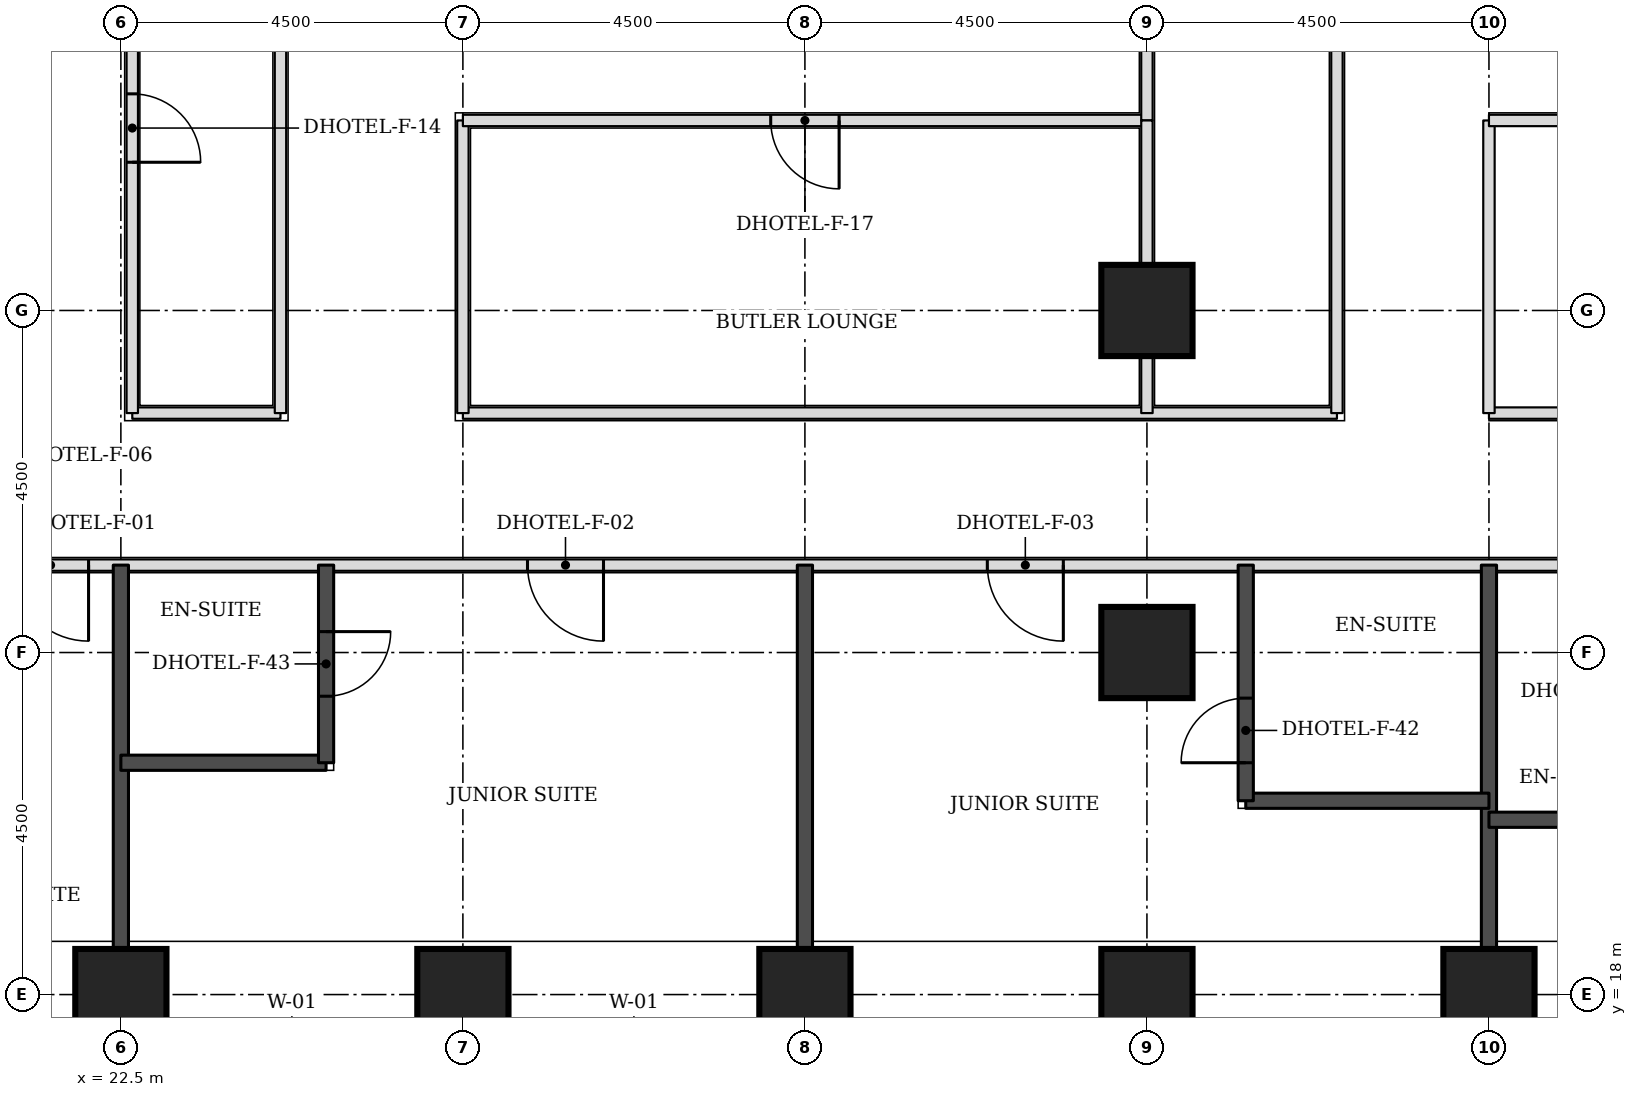
"""IFC4 building model, lengths in metres.
Left out: names, types, materials, properties, quantities, classifications, styles, units other than length and angle.
Written with IfcOpenShell. Run it as: python <this file> out.ifc"""

import sys

from ifc_helpers import new_model, si_unit, direction, frame, frame_2d, origin, origin_2d, place, context, subcontext, project, spatial, rectangle, extrude, element, fill, save


model = new_model("IFC4")
c1 = context("Model", 3, precision=1e-05, world=origin(), true_north=direction((0.0, 1.0)))
c2 = subcontext(c1, "Body", "Model", "MODEL_VIEW")
j1 = project(units=[si_unit("LENGTHUNIT", "METRE"), si_unit("PLANEANGLEUNIT", "RADIAN")], contexts=[c1])
p1 = place(None, origin())
s1 = spatial("IfcSite", under=j1, at=p1, CompositionType="ELEMENT")
p2 = place(p1, origin())
s2 = spatial("IfcBuilding", under=s1, at=p2, CompositionType="ELEMENT")
p3 = place(p2, frame((0.0, 0.0, 42.9)))
s3 = spatial("IfcBuildingStorey", under=s2, at=p3, CompositionType="ELEMENT", Elevation=42.9)
for number, where, z_axis, x_axis in (
    (1, (22.5, 18.0, 0.0), (0.0, 0.0, 1.0), (1.0, 0.0, 0.0)),
    (2, (27.0, 18.0, 0.0), (0.0, 0.0, 1.0), (1.0, 0.0, 0.0)),
    (3, (31.5, 18.0, 0.0), (0.0, 0.0, 1.0), (1.0, 0.0, 0.0)),
    (4, (36.0, 18.0, 0.0), (0.0, 0.0, 1.0), (1.0, 0.0, 0.0)),
    (5, (40.5, 18.0, 0.0), (0.0, 0.0, 1.0), (1.0, 0.0, 0.0)),
    (6, (36.0, 22.5, 0.0), (0.0, 0.0, 1.0), (1.0, 0.0, 0.0)),
    (7, (36.0, 27.0, 0.0), (0.0, 0.0, 1.0), (1.0, 0.0, 0.0)),
):
    element("IfcColumn", number, at=place(p3, frame(where, z_axis=z_axis, x_axis=x_axis)), inside=s3, PredefinedType="COLUMN", context=c2, shape_type="SweptSolid", body=[
        extrude(rectangle(XDim=1.2, YDim=1.2, at=origin_2d()), origin(), (0.0, 0.0, 1.0), 3.3),
    ])
p4 = place(p3, frame((20.65, 23.65, 0.0), z_axis=(0.0, 0.0, 1.0), x_axis=(1.0, 0.0, 0.0)))
e8 = element("IfcWall", 8, at=p4, inside=s3, PredefinedType="PARTITIONING", context=c2, shape_type="SweptSolid", body=[
    extrude(rectangle(XDim=30.85, YDim=0.15, at=frame_2d((15.425, 0.0))), origin(), (0.0, 0.0, 1.0), 3.08),
])
p5 = place(p4, frame((7.2, 0.0, 0.0)))
e9 = element("IfcOpeningElement", 9, at=p5, cuts=e8, PredefinedType="OPENING", context=c2, shape_type="SweptSolid", body=[
    extrude(rectangle(XDim=1.0, YDim=2.1, at=frame_2d((0.5, 1.05))), frame((0.0, 0.085, 0.0), z_axis=(0.0, -1.0, 0.0), x_axis=(1.0, 0.0, 0.0)), (0.0, 0.0, 1.0), 0.17),
])
p6 = place(p4, frame((13.25, 0.0, 0.0)))
e10 = element("IfcOpeningElement", 10, at=p6, cuts=e8, PredefinedType="OPENING", context=c2, shape_type="SweptSolid", body=[
    extrude(rectangle(XDim=1.0, YDim=2.1, at=frame_2d((0.5, 1.05))), frame((0.0, 0.085, 0.0), z_axis=(0.0, -1.0, 0.0), x_axis=(1.0, 0.0, 0.0)), (0.0, 0.0, 1.0), 0.17),
])
p7 = place(p4, frame((25.2, 0.0, 0.0)))
e11 = element("IfcOpeningElement", 11, at=p7, cuts=e8, PredefinedType="OPENING", context=c2, shape_type="SweptSolid", body=[
    extrude(rectangle(XDim=1.0, YDim=2.1, at=frame_2d((0.5, 1.05))), frame((0.0, 0.085, 0.0), z_axis=(0.0, -1.0, 0.0), x_axis=(1.0, 0.0, 0.0)), (0.0, 0.0, 1.0), 0.17),
])
p8 = place(p4, frame((0.425, 0.0, 0.0)))
e12 = element("IfcOpeningElement", 12, at=p8, cuts=e8, PredefinedType="OPENING", context=c2, shape_type="SweptSolid", body=[
    extrude(rectangle(XDim=1.0, YDim=2.1, at=frame_2d((0.5, 1.05))), frame((0.0, 0.085, 0.0), z_axis=(0.0, -1.0, 0.0), x_axis=(1.0, 0.0, 0.0)), (0.0, 0.0, 1.0), 0.17),
])
p9 = place(p4, frame((29.35, 0.0, 0.0)))
e13 = element("IfcOpeningElement", 13, at=p9, cuts=e8, PredefinedType="OPENING", context=c2, shape_type="SweptSolid", body=[
    extrude(rectangle(XDim=1.0, YDim=2.1, at=frame_2d((0.5, 1.05))), frame((0.0, 0.085, 0.0), z_axis=(0.0, -1.0, 0.0), x_axis=(1.0, 0.0, 0.0)), (0.0, 0.0, 1.0), 0.17),
])
p10 = place(p3, frame((22.65, 25.65, 0.0), z_axis=(0.0, 0.0, 1.0), x_axis=(1.0, 0.0, 0.0)))
e14 = element("IfcWall", 14, at=p10, inside=s3, PredefinedType="PARTITIONING", context=c2, shape_type="SweptSolid", body=[
    extrude(rectangle(XDim=1.95, YDim=0.15, at=frame_2d((0.975, 0.0))), origin(), (0.0, 0.0, 1.0), 3.08),
])
p11 = place(p3, frame((22.65, 25.65, 0.0), z_axis=(0.0, 0.0, 1.0), x_axis=(0.0, 1.0, 0.0)))
e15 = element("IfcWall", 15, at=p11, inside=s3, PredefinedType="PARTITIONING", context=c2, shape_type="SweptSolid", body=[
    extrude(rectangle(XDim=17.35, YDim=0.15, at=frame_2d((8.675, 0.0))), origin(), (0.0, 0.0, 1.0), 3.08),
])
p12 = place(p11, frame((3.3, 0.0, 0.0)))
e16 = element("IfcOpeningElement", 16, at=p12, cuts=e15, PredefinedType="OPENING", context=c2, shape_type="SweptSolid", body=[
    extrude(rectangle(XDim=0.9, YDim=2.1, at=frame_2d((0.45, 1.05))), frame((0.0, 0.085, 0.0), z_axis=(0.0, -1.0, 0.0), x_axis=(1.0, 0.0, 0.0)), (0.0, 0.0, 1.0), 0.17),
])
p13 = place(p3, frame((24.6, 25.65, 0.0), z_axis=(0.0, 0.0, 1.0), x_axis=(0.0, 1.0, 0.0)))
e17 = element("IfcWall", 17, at=p13, inside=s3, PredefinedType="PARTITIONING", context=c2, shape_type="SweptSolid", body=[
    extrude(rectangle(XDim=14.85, YDim=0.15, at=frame_2d((7.425, 0.0))), origin(), (0.0, 0.0, 1.0), 3.08),
])
p14 = place(p3, frame((27.0, 25.65, 0.0), z_axis=(0.0, 0.0, 1.0), x_axis=(1.0, 0.0, 0.0)))
e18 = element("IfcWall", 18, at=p14, inside=s3, PredefinedType="PARTITIONING", context=c2, shape_type="SweptSolid", body=[
    extrude(rectangle(XDim=11.5, YDim=0.15, at=frame_2d((5.75, 0.0))), origin(), (0.0, 0.0, 1.0), 3.08),
])
p15 = place(p3, frame((27.0, 25.65, 0.0), z_axis=(0.0, 0.0, 1.0), x_axis=(0.0, 1.0, 0.0)))
e19 = element("IfcWall", 19, at=p15, inside=s3, PredefinedType="PARTITIONING", context=c2, shape_type="SweptSolid", body=[
    extrude(rectangle(XDim=3.85, YDim=0.15, at=frame_2d((1.925, 0.0))), origin(), (0.0, 0.0, 1.0), 3.08),
])
p16 = place(p3, frame((38.5, 25.65, 0.0), z_axis=(0.0, 0.0, 1.0), x_axis=(0.0, 1.0, 0.0)))
e20 = element("IfcWall", 20, at=p16, inside=s3, PredefinedType="PARTITIONING", context=c2, shape_type="SweptSolid", body=[
    extrude(rectangle(XDim=14.85, YDim=0.15, at=frame_2d((7.425, 0.0))), origin(), (0.0, 0.0, 1.0), 3.08),
])
p17 = place(p16, frame((6.975, 0.0, 0.0)))
e21 = element("IfcOpeningElement", 21, at=p17, cuts=e20, PredefinedType="OPENING", context=c2, shape_type="SweptSolid", body=[
    extrude(rectangle(XDim=0.9, YDim=2.1, at=frame_2d((0.45, 1.05))), frame((0.0, 0.085, 0.0), z_axis=(0.0, -1.0, 0.0), x_axis=(1.0, 0.0, 0.0)), (0.0, 0.0, 1.0), 0.17),
])
p18 = place(p3, frame((40.5, 25.65, 0.0), z_axis=(0.0, 0.0, 1.0), x_axis=(1.0, 0.0, 0.0)))
e22 = element("IfcWall", 22, at=p18, inside=s3, PredefinedType="PARTITIONING", context=c2, shape_type="SweptSolid", body=[
    extrude(rectangle(XDim=9.0, YDim=0.15, at=frame_2d((4.5, 0.0))), origin(), (0.0, 0.0, 1.0), 3.08),
])
p19 = place(p18, frame((4.05, 0.0, 0.0)))
e23 = element("IfcOpeningElement", 23, at=p19, cuts=e22, PredefinedType="OPENING", context=c2, shape_type="SweptSolid", body=[
    extrude(rectangle(XDim=0.9, YDim=2.1, at=frame_2d((0.45, 1.05))), frame((0.0, 0.085, 0.0), z_axis=(0.0, -1.0, 0.0), x_axis=(1.0, 0.0, 0.0)), (0.0, 0.0, 1.0), 0.17),
])
p20 = place(p3, frame((40.5, 25.65, 0.0), z_axis=(0.0, 0.0, 1.0), x_axis=(0.0, 1.0, 0.0)))
e24 = element("IfcWall", 24, at=p20, inside=s3, PredefinedType="PARTITIONING", context=c2, shape_type="SweptSolid", body=[
    extrude(rectangle(XDim=3.85, YDim=0.15, at=frame_2d((1.925, 0.0))), origin(), (0.0, 0.0, 1.0), 3.08),
])
p21 = place(p3, frame((27.0, 29.5, 0.0), z_axis=(0.0, 0.0, 1.0), x_axis=(1.0, 0.0, 0.0)))
e25 = element("IfcWall", 25, at=p21, inside=s3, PredefinedType="PARTITIONING", context=c2, shape_type="SweptSolid", body=[
    extrude(rectangle(XDim=9.0, YDim=0.15, at=frame_2d((4.5, 0.0))), origin(), (0.0, 0.0, 1.0), 3.08),
])
p22 = place(p21, frame((4.05, 0.0, 0.0)))
e26 = element("IfcOpeningElement", 26, at=p22, cuts=e25, PredefinedType="OPENING", context=c2, shape_type="SweptSolid", body=[
    extrude(rectangle(XDim=0.9, YDim=2.1, at=frame_2d((0.45, 1.05))), frame((0.0, 0.085, 0.0), z_axis=(0.0, -1.0, 0.0), x_axis=(1.0, 0.0, 0.0)), (0.0, 0.0, 1.0), 0.17),
])
p23 = place(p3, frame((36.0, 29.5, 0.0), z_axis=(0.0, 0.0, 1.0), x_axis=(0.0, 1.0, 0.0)))
e27 = element("IfcWall", 27, at=p23, inside=s3, PredefinedType="PARTITIONING", context=c2, shape_type="SweptSolid", body=[
    extrude(rectangle(XDim=1.95, YDim=0.15, at=frame_2d((0.975, 0.0))), origin(), (0.0, 0.0, 1.0), 2.33),
])
p24 = place(p3, frame((40.5, 29.5, 0.0), z_axis=(0.0, 0.0, 1.0), x_axis=(1.0, 0.0, 0.0)))
e28 = element("IfcWall", 28, at=p24, inside=s3, PredefinedType="PARTITIONING", context=c2, shape_type="SweptSolid", body=[
    extrude(rectangle(XDim=9.0, YDim=0.15, at=frame_2d((4.5, 0.0))), origin(), (0.0, 0.0, 1.0), 3.08),
])
for number, where, z_axis, x_axis in (
    (29, (22.5, 18.6, 0.0), (0.0, 0.0, 1.0), (0.0, 1.0, 0.0)),
    (30, (31.5, 18.6, 0.0), (0.0, 0.0, 1.0), (0.0, 1.0, 0.0)),
    (31, (40.5, 18.6, 0.0), (0.0, 0.0, 1.0), (0.0, 1.0, 0.0)),
):
    element("IfcWall", number, at=place(p3, frame(where, z_axis=z_axis, x_axis=x_axis)), inside=s3, PredefinedType="SOLIDWALL", context=c2, shape_type="SweptSolid", body=[
        extrude(rectangle(XDim=5.05, YDim=0.2, at=frame_2d((2.525, 0.0))), origin(), (0.0, 0.0, 1.0), 3.08),
    ])
p25 = place(p3, frame((40.5, 20.3, 0.0), z_axis=(0.0, 0.0, 1.0), x_axis=(1.0, 0.0, 0.0)))
e32 = element("IfcWall", 32, at=p25, inside=s3, PredefinedType="SOLIDWALL", context=c2, shape_type="SweptSolid", body=[
    extrude(rectangle(XDim=2.7, YDim=0.2, at=frame_2d((1.35, 0.0))), origin(), (0.0, 0.0, 1.0), 3.08),
])
p26 = place(p3, frame((37.3, 20.55, 0.0), z_axis=(0.0, 0.0, 1.0), x_axis=(1.0, 0.0, 0.0)))
e33 = element("IfcWall", 33, at=p26, inside=s3, PredefinedType="SOLIDWALL", context=c2, shape_type="SweptSolid", body=[
    extrude(rectangle(XDim=3.2, YDim=0.2, at=frame_2d((1.6, 0.0))), origin(), (0.0, 0.0, 1.0), 3.08),
])
p27 = place(p3, frame((37.3, 20.55, 0.0), z_axis=(0.0, 0.0, 1.0), x_axis=(0.0, 1.0, 0.0)))
e34 = element("IfcWall", 34, at=p27, inside=s3, PredefinedType="SOLIDWALL", context=c2, shape_type="SweptSolid", body=[
    extrude(rectangle(XDim=3.1, YDim=0.2, at=frame_2d((1.55, 0.0))), origin(), (0.0, 0.0, 1.0), 3.08),
])
p28 = place(p27, frame((0.5, 0.0, 0.0)))
e35 = element("IfcOpeningElement", 35, at=p28, cuts=e34, PredefinedType="OPENING", context=c2, shape_type="SweptSolid", body=[
    extrude(rectangle(XDim=0.85, YDim=2.1, at=frame_2d((0.425, 1.05))), frame((0.0, 0.11, 0.0), z_axis=(0.0, -1.0, 0.0), x_axis=(1.0, 0.0, 0.0)), (0.0, 0.0, 1.0), 0.22),
])
p29 = place(p3, frame((22.5, 21.05, 0.0), z_axis=(0.0, 0.0, 1.0), x_axis=(1.0, 0.0, 0.0)))
e36 = element("IfcWall", 36, at=p29, inside=s3, PredefinedType="SOLIDWALL", context=c2, shape_type="SweptSolid", body=[
    extrude(rectangle(XDim=2.7, YDim=0.2, at=frame_2d((1.35, 0.0))), origin(), (0.0, 0.0, 1.0), 3.08),
])
p30 = place(p3, frame((25.2, 21.05, 0.0), z_axis=(0.0, 0.0, 1.0), x_axis=(0.0, 1.0, 0.0)))
e37 = element("IfcWall", 37, at=p30, inside=s3, PredefinedType="SOLIDWALL", context=c2, shape_type="SweptSolid", body=[
    extrude(rectangle(XDim=2.6, YDim=0.2, at=frame_2d((1.3, 0.0))), origin(), (0.0, 0.0, 1.0), 3.08),
])
p31 = place(p30, frame((0.875, 0.0, 0.0)))
e38 = element("IfcOpeningElement", 38, at=p31, cuts=e37, PredefinedType="OPENING", context=c2, shape_type="SweptSolid", body=[
    extrude(rectangle(XDim=0.85, YDim=2.1, at=frame_2d((0.425, 1.05))), frame((0.0, 0.11, 0.0), z_axis=(0.0, -1.0, 0.0), x_axis=(1.0, 0.0, 0.0)), (0.0, 0.0, 1.0), 0.22),
])
p32 = place(p3, frame((36.0, 25.65, 0.0), z_axis=(0.0, 0.0, 1.0), x_axis=(0.0, 1.0, 0.0)))
e39 = element("IfcWall", 39, at=p32, inside=s3, PredefinedType="PARTITIONING", context=c2, shape_type="SweptSolid", body=[
    extrude(rectangle(XDim=3.85, YDim=0.15, at=frame_2d((1.925, 0.0))), origin(), (0.0, 0.0, 1.0), 2.33),
])
p33 = place(p5, frame((1.0, 0.0, 0.0), z_axis=(0.0, 0.0, 1.0), x_axis=(-1.0, 0.0, 0.0)))
e40 = element("IfcDoor", 40, at=p33, inside=s3, OperationType="SINGLE_SWING_LEFT", PredefinedType="DOOR", context=c2, shape_type="SweptSolid", body=[
    extrude(rectangle(XDim=1.0, YDim=2.1, at=frame_2d((0.5, 1.05))), frame((0.0, 0.025, 0.0), z_axis=(0.0, -1.0, 0.0), x_axis=(1.0, 0.0, 0.0)), (0.0, 0.0, 1.0), 0.05),
])
fill(e9, e40)
p34 = place(p31, frame((0.85, 0.0, 0.0), z_axis=(0.0, 0.0, 1.0), x_axis=(-1.0, 0.0, 0.0)))
e41 = element("IfcDoor", 41, at=p34, inside=s3, OperationType="SINGLE_SWING_LEFT", PredefinedType="DOOR", context=c2, shape_type="SweptSolid", body=[
    extrude(rectangle(XDim=0.85, YDim=2.1, at=frame_2d((0.425, 1.05))), frame((0.0, 0.025, 0.0), z_axis=(0.0, -1.0, 0.0), x_axis=(1.0, 0.0, 0.0)), (0.0, 0.0, 1.0), 0.05),
])
fill(e38, e41)
p35 = place(p6, frame((1.0, 0.0, 0.0), z_axis=(0.0, 0.0, 1.0), x_axis=(-1.0, 0.0, 0.0)))
e42 = element("IfcDoor", 42, at=p35, inside=s3, OperationType="SINGLE_SWING_LEFT", PredefinedType="DOOR", context=c2, shape_type="SweptSolid", body=[
    extrude(rectangle(XDim=1.0, YDim=2.1, at=frame_2d((0.5, 1.05))), frame((0.0, 0.025, 0.0), z_axis=(0.0, -1.0, 0.0), x_axis=(1.0, 0.0, 0.0)), (0.0, 0.0, 1.0), 0.05),
])
fill(e10, e42)
p36 = place(p28, origin())
e43 = element("IfcDoor", 43, at=p36, inside=s3, OperationType="SINGLE_SWING_LEFT", PredefinedType="DOOR", context=c2, shape_type="SweptSolid", body=[
    extrude(rectangle(XDim=0.85, YDim=2.1, at=frame_2d((0.425, 1.05))), frame((0.0, 0.025, 0.0), z_axis=(0.0, -1.0, 0.0), x_axis=(1.0, 0.0, 0.0)), (0.0, 0.0, 1.0), 0.05),
])
fill(e35, e43)
p37 = place(p8, frame((1.0, 0.0, 0.0), z_axis=(0.0, 0.0, 1.0), x_axis=(-1.0, 0.0, 0.0)))
e44 = element("IfcDoor", 44, at=p37, inside=s3, OperationType="SINGLE_SWING_LEFT", PredefinedType="DOOR", context=c2, shape_type="SweptSolid", body=[
    extrude(rectangle(XDim=1.0, YDim=2.1, at=frame_2d((0.5, 1.05))), frame((0.0, 0.025, 0.0), z_axis=(0.0, -1.0, 0.0), x_axis=(1.0, 0.0, 0.0)), (0.0, 0.0, 1.0), 0.05),
])
fill(e12, e44)
p38 = place(p12, frame((0.9, 0.0, 0.0), z_axis=(0.0, 0.0, 1.0), x_axis=(-1.0, 0.0, 0.0)))
e45 = element("IfcDoor", 45, at=p38, inside=s3, OperationType="SINGLE_SWING_RIGHT", PredefinedType="DOOR", context=c2, shape_type="SweptSolid", body=[
    extrude(rectangle(XDim=0.9, YDim=2.1, at=frame_2d((0.45, 1.05))), frame((0.0, 0.025, 0.0), z_axis=(0.0, -1.0, 0.0), x_axis=(1.0, 0.0, 0.0)), (0.0, 0.0, 1.0), 0.05),
])
fill(e16, e45)
p39 = place(p22, frame((0.9, 0.0, 0.0), z_axis=(0.0, 0.0, 1.0), x_axis=(-1.0, 0.0, 0.0)))
e46 = element("IfcDoor", 46, at=p39, inside=s3, OperationType="SINGLE_SWING_LEFT", PredefinedType="DOOR", context=c2, shape_type="SweptSolid", body=[
    extrude(rectangle(XDim=0.9, YDim=2.1, at=frame_2d((0.45, 1.05))), frame((0.0, 0.025, 0.0), z_axis=(0.0, -1.0, 0.0), x_axis=(1.0, 0.0, 0.0)), (0.0, 0.0, 1.0), 0.05),
])
fill(e26, e46)
save(model, sys.argv[1])
